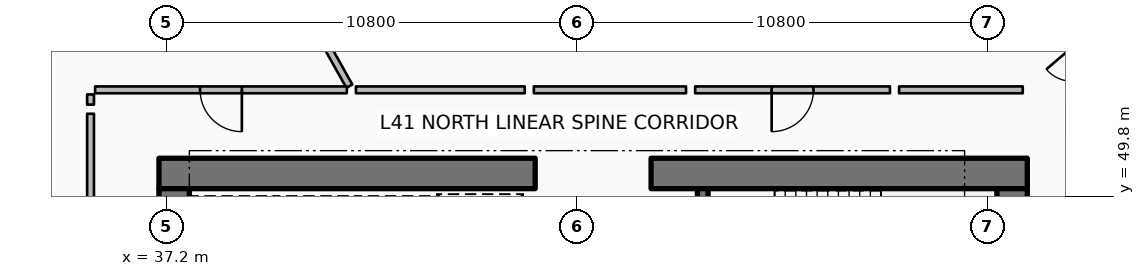
"""IFC4 building model, lengths in metres.
Left out: names, types, materials, properties, quantities, classifications, styles, units other than length and angle.
Written with IfcOpenShell. Run it as: python <this file> out.ifc"""

import sys

from ifc_helpers import new_model, si_unit, direction, frame, frame_2d, origin, place, context, subcontext, project, spatial, rectangle, extrude, element, fill, save


model = new_model("IFC4")
c1 = context("Model", 3, precision=1e-05, world=origin(), true_north=direction((0.0, 1.0)))
c2 = subcontext(c1, "Body", "Model", "MODEL_VIEW")
j1 = project(units=[si_unit("LENGTHUNIT", "METRE"), si_unit("PLANEANGLEUNIT", "RADIAN")], contexts=[c1])
p1 = place(None, origin())
s1 = spatial("IfcSite", under=j1, at=p1, CompositionType="ELEMENT")
p2 = place(p1, origin())
s2 = spatial("IfcBuilding", under=s1, at=p2, CompositionType="ELEMENT")
p3 = place(p2, frame((0.0, 0.0, 165.3)))
s3 = spatial("IfcBuildingStorey", under=s2, at=p3, CompositionType="ELEMENT", Elevation=165.3)
p4 = place(p3, frame((37.0, 50.4, 0.0), z_axis=(0.0, 0.0, 1.0), x_axis=(1.0, 0.0, 0.0)))
e1 = element("IfcWall", 1, at=p4, inside=s3, PredefinedType="SHEAR", context=c2, shape_type="SweptSolid", body=[
    extrude(rectangle(XDim=9.9, YDim=0.8, at=frame_2d((4.95, 0.0))), origin(), (0.0, 0.0, 1.0), 3.75),
])
p5 = place(p3, frame((49.95, 50.4, 0.0), z_axis=(0.0, 0.0, 1.0), x_axis=(1.0, 0.0, 0.0)))
e2 = element("IfcWall", 2, at=p5, inside=s3, PredefinedType="SHEAR", context=c2, shape_type="SweptSolid", body=[
    extrude(rectangle(XDim=9.9, YDim=0.8, at=frame_2d((4.95, 0.0))), origin(), (0.0, 0.0, 1.0), 3.75),
])
for number, where, z_axis, x_axis in (
    (3, (37.4, 34.0, 0.0), (0.0, 0.0, 1.0), (0.0, 1.0, 0.0)),
    (4, (59.45, 34.0, 0.0), (0.0, 0.0, 1.0), (0.0, 1.0, 0.0)),
):
    element("IfcWall", number, at=place(p3, frame(where, z_axis=z_axis, x_axis=x_axis)), inside=s3, PredefinedType="SHEAR", context=c2, shape_type="SweptSolid", body=[
        extrude(rectangle(XDim=16.0, YDim=0.8, at=frame_2d((8.0, 0.0))), origin(), (0.0, 0.0, 1.0), 3.75),
    ])
p6 = place(p3, frame((51.31, 46.5, 0.0), z_axis=(0.0, 0.0, 1.0), x_axis=(0.0, 1.0, 0.0)))
e5 = element("IfcWall", 5, at=p6, inside=s3, PredefinedType="SHEAR", context=c2, shape_type="SweptSolid", body=[
    extrude(rectangle(XDim=3.5, YDim=0.28, at=frame_2d((1.75, 0.0))), origin(), (0.0, 0.0, 1.0), 3.75),
])
p7 = place(p3, frame((42.01, 52.696, 0.0), z_axis=(0.0, 0.0, 1.0), x_axis=(-0.488627157427, 0.872492693967, 0.0)))
e6 = element("IfcWall", 6, at=p7, inside=s3, PredefinedType="PARTITIONING", context=c2, shape_type="SweptSolid", body=[
    extrude(rectangle(XDim=9.375, YDim=0.18, at=frame_2d((4.688, 0.0))), origin(), (0.0, 0.0, 1.0), 2.94),
])
p8 = place(p3, frame((41.944, 52.6, 0.0), z_axis=(0.0, 0.0, 1.0), x_axis=(-1.0, 0.0, 0.0)))
e7 = element("IfcWall", 7, at=p8, inside=s3, PredefinedType="PARTITIONING", context=c2, shape_type="SweptSolid", body=[
    extrude(rectangle(XDim=6.624, YDim=0.18, at=frame_2d((3.312, 0.0))), origin(), (0.0, 0.0, 1.0), 2.94),
])
p9 = place(p8, frame((2.762, 0.0, 0.0)))
e8 = element("IfcOpeningElement", 8, at=p9, cuts=e7, PredefinedType="OPENING", context=c2, shape_type="SweptSolid", body=[
    extrude(rectangle(XDim=1.1, YDim=2.1, at=frame_2d((0.55, 1.05))), frame((0.0, 0.1, 0.0), z_axis=(0.0, -1.0, 0.0), x_axis=(1.0, 0.0, 0.0)), (0.0, 0.0, 1.0), 0.2),
])
p10 = place(p3, frame((35.2, 52.48, 0.0), z_axis=(0.0, 0.0, 1.0), x_axis=(0.0, -1.0, 0.0)))
e9 = element("IfcWall", 9, at=p10, inside=s3, PredefinedType="PARTITIONING", context=c2, shape_type="SweptSolid", body=[
    extrude(rectangle(XDim=0.269, YDim=0.18, at=frame_2d((0.135, 0.0))), origin(), (0.0, 0.0, 1.0), 2.94),
])
p11 = place(p3, frame((35.2, 51.971, 0.0), z_axis=(0.0, 0.0, 1.0), x_axis=(0.0, -1.0, 0.0)))
e10 = element("IfcWall", 10, at=p11, inside=s3, PredefinedType="PARTITIONING", context=c2, shape_type="SweptSolid", body=[
    extrude(rectangle(XDim=6.241, YDim=0.18, at=frame_2d((3.12, 0.0))), origin(), (0.0, 0.0, 1.0), 2.94),
])
p12 = place(p3, frame((56.236, 52.6, 0.0), z_axis=(0.0, 0.0, 1.0), x_axis=(-1.0, 0.0, 0.0)))
e11 = element("IfcWall", 11, at=p12, inside=s3, PredefinedType="PARTITIONING", context=c2, shape_type="SweptSolid", body=[
    extrude(rectangle(XDim=5.127, YDim=0.18, at=frame_2d((2.563, 0.0))), origin(), (0.0, 0.0, 1.0), 2.94),
])
p13 = place(p12, frame((2.013, 0.0, 0.0)))
e12 = element("IfcOpeningElement", 12, at=p13, cuts=e11, PredefinedType="OPENING", context=c2, shape_type="SweptSolid", body=[
    extrude(rectangle(XDim=1.1, YDim=2.1, at=frame_2d((0.55, 1.05))), frame((0.0, 0.1, 0.0), z_axis=(0.0, -1.0, 0.0), x_axis=(1.0, 0.0, 0.0)), (0.0, 0.0, 1.0), 0.2),
])
p14 = place(p3, frame((59.73, 52.6, 0.0), z_axis=(0.0, 0.0, 1.0), x_axis=(-1.0, 0.0, 0.0)))
e13 = element("IfcWall", 13, at=p14, inside=s3, PredefinedType="PARTITIONING", context=c2, shape_type="SweptSolid", body=[
    extrude(rectangle(XDim=3.254, YDim=0.18, at=frame_2d((1.627, 0.0))), origin(), (0.0, 0.0, 1.0), 2.94),
])
p15 = place(p3, frame((63.52, 50.815, 0.0), z_axis=(0.0, 0.0, 1.0), x_axis=(-0.649447526186, 0.760406411553, 0.0)))
e14 = element("IfcWall", 14, at=p15, inside=s3, PredefinedType="PARTITIONING", context=c2, shape_type="SweptSolid", body=[
    extrude(rectangle(XDim=6.753, YDim=0.125, at=frame_2d((3.376, 0.0))), origin(), (0.0, 0.0, 1.0), 2.94),
])
p16 = place(p15, frame((2.926, 0.0, 0.0)))
e15 = element("IfcOpeningElement", 15, at=p16, cuts=e14, PredefinedType="OPENING", context=c2, shape_type="SweptSolid", body=[
    extrude(rectangle(XDim=0.9, YDim=2.08, at=frame_2d((0.45, 1.04))), frame((0.0, 0.073, 0.0), z_axis=(0.0, -1.0, 0.0), x_axis=(1.0, 0.0, 0.0)), (0.0, 0.0, 1.0), 0.145),
])
p17 = place(p3, frame((50.869, 52.6, 0.0), z_axis=(0.0, 0.0, 1.0), x_axis=(-1.0, 0.0, 0.0)))
e16 = element("IfcWall", 16, at=p17, inside=s3, PredefinedType="PARTITIONING", context=c2, shape_type="SweptSolid", body=[
    extrude(rectangle(XDim=4.004, YDim=0.18, at=frame_2d((2.002, 0.0))), origin(), (0.0, 0.0, 1.0), 2.94),
])
p18 = place(p3, frame((46.625, 52.6, 0.0), z_axis=(0.0, 0.0, 1.0), x_axis=(-1.0, 0.0, 0.0)))
e17 = element("IfcWall", 17, at=p18, inside=s3, PredefinedType="PARTITIONING", context=c2, shape_type="SweptSolid", body=[
    extrude(rectangle(XDim=4.442, YDim=0.18, at=frame_2d((2.221, 0.0))), origin(), (0.0, 0.0, 1.0), 2.94),
])
p19 = place(p9, origin())
e18 = element("IfcDoor", 18, at=p19, inside=s3, OperationType="SINGLE_SWING_LEFT", PredefinedType="DOOR", context=c2, shape_type="SweptSolid", body=[
    extrude(rectangle(XDim=1.1, YDim=2.1, at=frame_2d((0.55, 1.05))), frame((0.0, 0.025, 0.0), z_axis=(0.0, -1.0, 0.0), x_axis=(1.0, 0.0, 0.0)), (0.0, 0.0, 1.0), 0.05),
])
fill(e8, e18)
p20 = place(p13, origin())
e19 = element("IfcDoor", 19, at=p20, inside=s3, OperationType="SINGLE_SWING_RIGHT", PredefinedType="DOOR", context=c2, shape_type="SweptSolid", body=[
    extrude(rectangle(XDim=1.1, YDim=2.1, at=frame_2d((0.55, 1.05))), frame((0.0, 0.025, 0.0), z_axis=(0.0, -1.0, 0.0), x_axis=(1.0, 0.0, 0.0)), (0.0, 0.0, 1.0), 0.05),
])
fill(e12, e19)
save(model, sys.argv[1])
